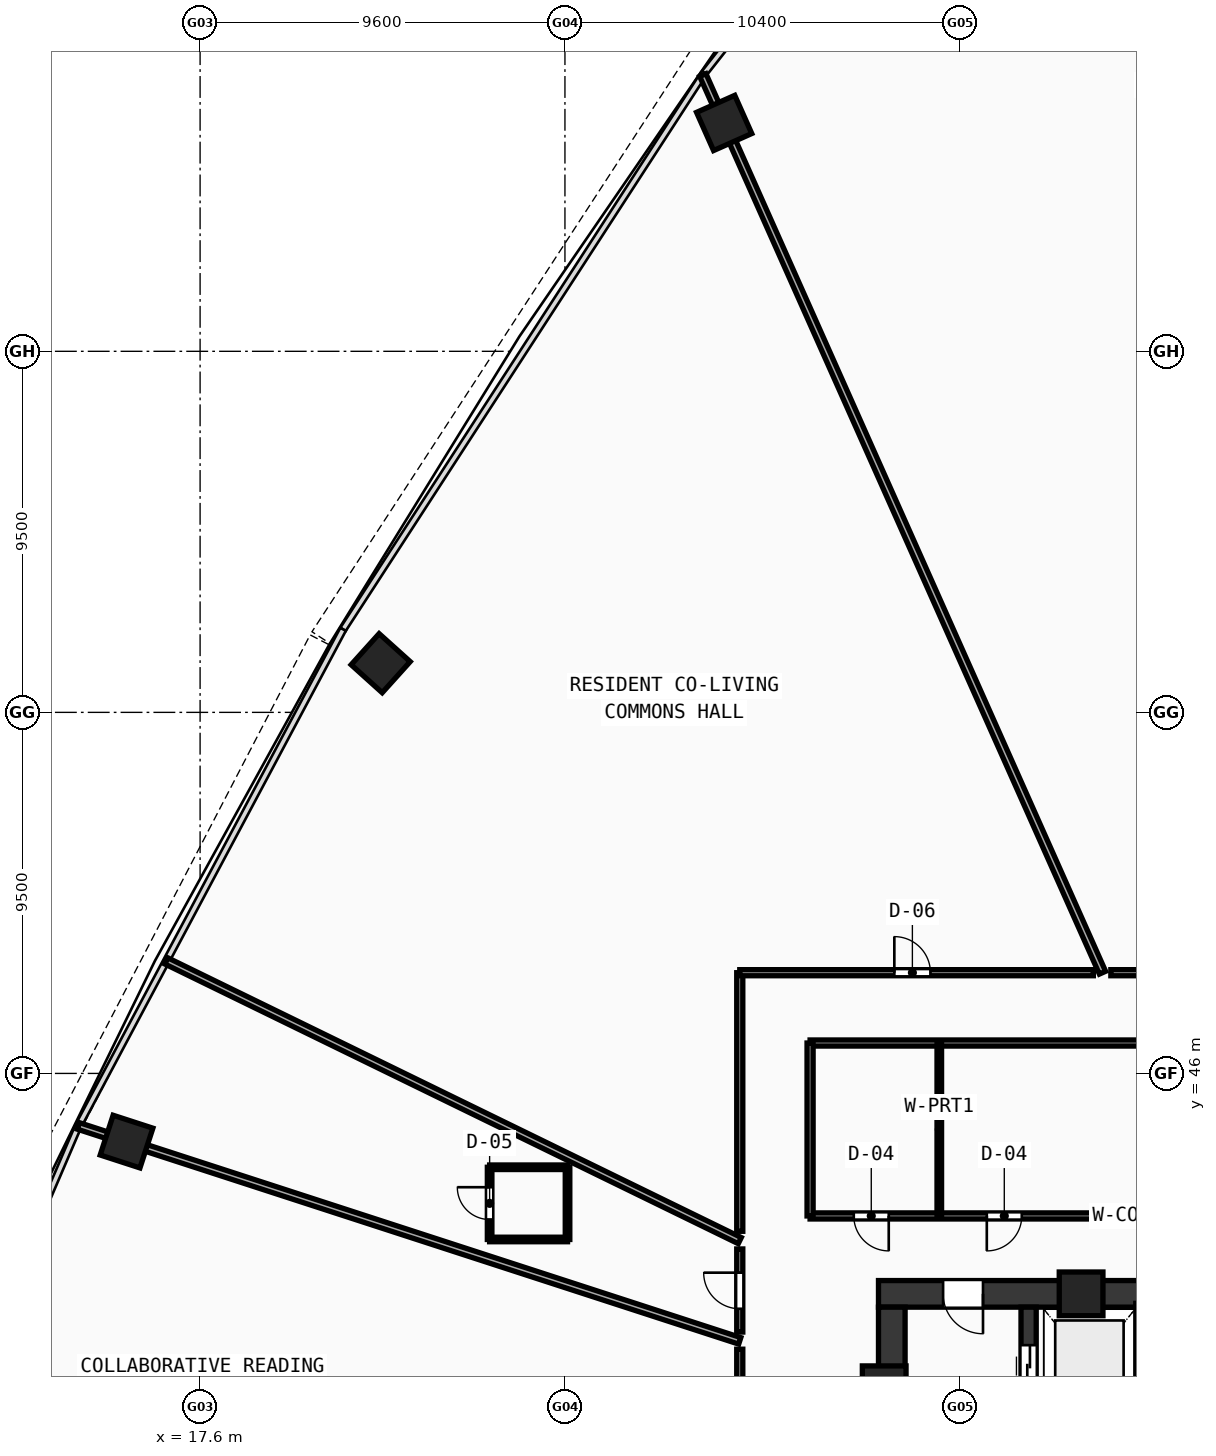
"""IFC4 building model, lengths in metres.
Left out: names, types, materials, properties, quantities, classifications, styles, units other than length and angle.
Written with IfcOpenShell. Run it as: python <this file> out.ifc"""

import sys

from ifc_helpers import new_model, si_unit, direction, frame, frame_2d, origin, origin_with_axes, origin_2d, place, context, subcontext, project, spatial, rectangle, hollow_rectangle, extrude, source, transform, mapped, element, fill, save


model = new_model("IFC4")
c1 = context("Model", 3, precision=1e-05, world=origin(), true_north=direction((0.0, 1.0)))
c2 = subcontext(c1, "Body", "Model", "MODEL_VIEW")
j1 = project(units=[si_unit("LENGTHUNIT", "METRE"), si_unit("PLANEANGLEUNIT", "RADIAN")], contexts=[c1])
p1 = place(None, origin())
s1 = spatial("IfcSite", under=j1, at=p1, CompositionType="ELEMENT")
p2 = place(p1, origin())
s2 = spatial("IfcBuilding", under=s1, at=p2, CompositionType="ELEMENT")
p3 = place(p2, frame((0.0, 0.0, 52.18)))
s3 = spatial("IfcBuildingStorey", under=s2, at=p3, CompositionType="ELEMENT", Elevation=52.18)
p4 = place(p3, frame((35.45, 40.2, 0.0), z_axis=(0.0, 0.0, 1.0), x_axis=(1.0, 0.0, 0.0)))
e1 = element("IfcWall", 1, at=p4, inside=s3, PredefinedType="SHEAR", context=c2, shape_type="SweptSolid", body=[
    extrude(rectangle(XDim=11.35, YDim=0.7, at=frame_2d((5.675, 0.0))), origin(), (0.0, 0.0, 1.0), 3.37),
])
p5 = place(p4, frame((1.7, 0.0, 0.0)))
e2 = element("IfcOpeningElement", 2, at=p5, cuts=e1, PredefinedType="OPENING", context=c2, shape_type="SweptSolid", body=[
    extrude(rectangle(XDim=1.05, YDim=2.1, at=frame_2d((0.525, 1.05))), frame((0.0, 0.36, 0.0), z_axis=(0.0, -1.0, 0.0), x_axis=(1.0, 0.0, 0.0)), (0.0, 0.0, 1.0), 0.72),
])
p6 = place(p3, frame((35.8, 27.85, 0.0), z_axis=(0.0, 0.0, 1.0), x_axis=(0.0, 1.0, 0.0)))
e3 = element("IfcWall", 3, at=p6, inside=s3, PredefinedType="SHEAR", context=c2, shape_type="SweptSolid", body=[
    extrude(rectangle(XDim=12.0, YDim=0.7, at=frame_2d((6.0, 0.0))), origin(), (0.0, 0.0, 1.0), 3.37),
])
p7 = place(p3, frame((39.4, 27.85, 0.0), z_axis=(0.0, 0.0, 1.0), x_axis=(0.0, 1.0, 0.0)))
e4 = element("IfcWall", 4, at=p7, inside=s3, PredefinedType="SHEAR", context=c2, shape_type="SweptSolid", body=[
    extrude(rectangle(XDim=12.0, YDim=0.4, at=frame_2d((6.0, 0.0))), origin(), (0.0, 0.0, 1.0), 3.37),
])
p8 = place(p7, frame((9.9, 0.0, 0.0)))
e5 = element("IfcOpeningElement", 5, at=p8, cuts=e4, PredefinedType="OPENING", context=c2, shape_type="SweptSolid", body=[
    extrude(rectangle(XDim=1.1, YDim=2.1, at=frame_2d((0.55, 1.05))), frame((0.0, 0.21, 0.0), z_axis=(0.0, -1.0, 0.0), x_axis=(1.0, 0.0, 0.0)), (0.0, 0.0, 1.0), 0.42),
])
m1 = source(origin(), c2, "Body", "SweptSolid", [
    extrude(hollow_rectangle(XDim=1.15, YDim=1.15, WallThickness=0.048, at=origin_2d()), origin(), (0.0, 0.0, 1.0), 3.63),
])
for number, where, z_axis, x_axis in (
    (6, (40.781, 40.2, -0.26), (0.0, 0.0, 1.0), (1.0, 0.0, 0.0)),
    (7, (35.6, 37.729, -0.26), (0.0, 0.0, 1.0), (1.0, 0.0, 0.0)),
):
    element("IfcColumn", number, at=place(p3, frame(where, z_axis=z_axis, x_axis=x_axis)), inside=s3, PredefinedType="COLUMN", context=c2, shape_type="MappedRepresentation", body=[
        mapped(m1, transform((0.0, 0.0, 0.0), scale=1.0)),
    ])
m2 = source(origin(), c2, "Body", "SweptSolid", [
    extrude(hollow_rectangle(XDim=1.1, YDim=1.1, WallThickness=0.045, at=origin_2d()), origin(), (0.0, 0.0, 1.0), 3.63),
])
for number, where, z_axis, x_axis in (
    (8, (31.389, 71.009, -0.26), (0.0, 0.0, 1.0), (-0.914, -0.407, 0.0)),
    (9, (22.351, 56.794, -0.26), (0.0, 0.0, 1.0), (-0.669, -0.743, 0.0)),
    (10, (15.665, 44.206, -0.26), (0.0, 0.0, 1.0), (-0.309, -0.951, 0.0)),
):
    element("IfcColumn", number, at=place(p3, frame(where, z_axis=z_axis, x_axis=x_axis)), inside=s3, PredefinedType="COLUMN", context=c2, shape_type="MappedRepresentation", body=[
        mapped(m2, transform((0.0, 0.0, 0.0), scale=1.0)),
    ])
p9 = place(p3, frame((42.32, 33.5, 0.0), z_axis=(0.0, 0.0, 1.0), x_axis=(0.0, 1.0, 0.0)))
e11 = element("IfcWall", 11, at=p9, inside=s3, PredefinedType="SOLIDWALL", context=c2, shape_type="SweptSolid", body=[
    extrude(rectangle(XDim=6.45, YDim=0.2, at=frame_2d((3.225, 0.0))), origin(), (0.0, 0.0, 1.0), 3.37),
])
p10 = place(p9, frame((1.0, 0.0, 0.0)))
e12 = element("IfcOpeningElement", 12, at=p10, cuts=e11, PredefinedType="OPENING", context=c2, shape_type="SweptSolid", body=[
    extrude(rectangle(XDim=1.05, YDim=2.1, at=frame_2d((0.525, 1.05))), frame((0.0, 0.11, 0.0), z_axis=(0.0, -1.0, 0.0), x_axis=(1.0, 0.0, 0.0)), (0.0, 0.0, 1.0), 0.22),
])
p11 = place(p3, frame((33.65, 42.25, 0.0), z_axis=(0.0, 0.0, 1.0), x_axis=(1.0, 0.0, 0.0)))
e13 = element("IfcWall", 13, at=p11, inside=s3, PredefinedType="PARTITIONING", context=c2, shape_type="SweptSolid", body=[
    extrude(rectangle(XDim=10.23, YDim=0.16, at=frame_2d((5.115, 0.0))), origin(), (0.0, 0.0, 1.0), 2.67),
])
p12 = place(p11, frame((1.15, 0.0, 0.0)))
e14 = element("IfcOpeningElement", 14, at=p12, cuts=e13, PredefinedType="OPENING", context=c2, shape_type="SweptSolid", body=[
    extrude(rectangle(XDim=0.92, YDim=2.1, at=frame_2d((0.46, 1.05))), frame((0.0, 0.09, 0.0), z_axis=(0.0, -1.0, 0.0), x_axis=(1.0, 0.0, 0.0)), (0.0, 0.0, 1.0), 0.18),
])
p13 = place(p11, frame((4.65, 0.0, 0.0)))
e15 = element("IfcOpeningElement", 15, at=p13, cuts=e13, PredefinedType="OPENING", context=c2, shape_type="SweptSolid", body=[
    extrude(rectangle(XDim=0.92, YDim=2.1, at=frame_2d((0.46, 1.05))), frame((0.0, 0.09, 0.0), z_axis=(0.0, -1.0, 0.0), x_axis=(1.0, 0.0, 0.0)), (0.0, 0.0, 1.0), 0.18),
])
p14 = place(p3, frame((33.65, 46.8, 0.0), z_axis=(0.0, 0.0, 1.0), x_axis=(1.0, 0.0, 0.0)))
e16 = element("IfcWall", 16, at=p14, inside=s3, PredefinedType="PARTITIONING", context=c2, shape_type="SweptSolid", body=[
    extrude(rectangle(XDim=10.23, YDim=0.16, at=frame_2d((5.115, 0.0))), origin(), (0.0, 0.0, 1.0), 2.67),
])
p15 = place(p3, frame((33.65, 42.25, 0.0), z_axis=(0.0, 0.0, 1.0), x_axis=(0.0, 1.0, 0.0)))
e17 = element("IfcWall", 17, at=p15, inside=s3, PredefinedType="PARTITIONING", context=c2, shape_type="SweptSolid", body=[
    extrude(rectangle(XDim=4.55, YDim=0.16, at=frame_2d((2.275, 0.0))), origin(), (0.0, 0.0, 1.0), 2.67),
])
p16 = place(p3, frame((37.05, 42.25, 0.0), z_axis=(0.0, 0.0, 1.0), x_axis=(0.0, 1.0, 0.0)))
e18 = element("IfcWall", 18, at=p16, inside=s3, PredefinedType="PARTITIONING", context=c2, shape_type="SweptSolid", body=[
    extrude(rectangle(XDim=4.55, YDim=0.12, at=frame_2d((2.275, 0.0))), origin(), (0.0, 0.0, 1.0), 2.67),
])
p17 = place(p3, frame((41.344, 48.65, 0.0), z_axis=(0.0, 0.0, 1.0), x_axis=(-0.406729800422, 0.913548504158, 0.0)))
e19 = element("IfcWall", 19, at=p17, inside=s3, PredefinedType="PARTITIONING", context=c2, shape_type="SweptSolid", body=[
    extrude(rectangle(XDim=25.854, YDim=0.18, at=frame_2d((12.927, 0.0))), origin(), (0.0, 0.0, 1.0), 2.67),
])
p18 = place(p3, frame((31.8, 41.601, 0.0), z_axis=(0.0, 0.0, 1.0), x_axis=(-0.898795978277, 0.438367185625, 0.0)))
e20 = element("IfcWall", 20, at=p18, inside=s3, PredefinedType="PARTITIONING", context=c2, shape_type="SweptSolid", body=[
    extrude(rectangle(XDim=16.788, YDim=0.18, at=frame_2d((8.394, 0.0))), origin(), (0.0, 0.0, 1.0), 2.67),
])
p19 = place(p3, frame((31.8, 38.964, 0.0), z_axis=(0.0, 0.0, 1.0), x_axis=(-0.951052304058, 0.309029958006, 0.0)))
e21 = element("IfcWall", 21, at=p19, inside=s3, PredefinedType="PARTITIONING", context=c2, shape_type="SweptSolid", body=[
    extrude(rectangle(XDim=18.299, YDim=0.18, at=frame_2d((9.149, 0.0))), origin(), (0.0, 0.0, 1.0), 2.67),
])
p20 = place(p3, frame((31.8, 33.354, 0.0), z_axis=(0.0, 0.0, 1.0), x_axis=(0.0, 1.0, 0.0)))
e22 = element("IfcWall", 22, at=p20, inside=s3, PredefinedType="PARTITIONING", context=c2, shape_type="SweptSolid", body=[
    extrude(rectangle(XDim=5.39, YDim=0.16, at=frame_2d((2.695, 0.0))), origin(), (0.0, 0.0, 1.0), 3.37),
])
p21 = place(p20, frame((2.22, 0.0, 0.0)))
e23 = element("IfcOpeningElement", 23, at=p21, cuts=e22, PredefinedType="OPENING", context=c2, shape_type="SweptSolid", body=[
    extrude(rectangle(XDim=0.95, YDim=2.1, at=frame_2d((0.475, 1.05))), frame((0.0, 0.09, 0.0), z_axis=(0.0, -1.0, 0.0), x_axis=(1.0, 0.0, 0.0)), (0.0, 0.0, 1.0), 0.18),
])
p22 = place(p3, frame((31.8, 39.195, 0.0), z_axis=(0.0, 0.0, 1.0), x_axis=(0.0, 1.0, 0.0)))
e24 = element("IfcWall", 24, at=p22, inside=s3, PredefinedType="PARTITIONING", context=c2, shape_type="SweptSolid", body=[
    extrude(rectangle(XDim=2.187, YDim=0.16, at=frame_2d((1.093, 0.0))), origin(), (0.0, 0.0, 1.0), 3.37),
])
p23 = place(p22, frame((0.613, 0.0, 0.0)))
e25 = element("IfcOpeningElement", 25, at=p23, cuts=e24, PredefinedType="OPENING", context=c2, shape_type="SweptSolid", body=[
    extrude(rectangle(XDim=0.95, YDim=2.1, at=frame_2d((0.475, 1.05))), frame((0.0, 0.09, 0.0), z_axis=(0.0, -1.0, 0.0), x_axis=(1.0, 0.0, 0.0)), (0.0, 0.0, 1.0), 0.18),
])
p24 = place(p3, frame((31.8, 41.846, 0.0), z_axis=(0.0, 0.0, 1.0), x_axis=(0.0, 1.0, 0.0)))
e26 = element("IfcWall", 26, at=p24, inside=s3, PredefinedType="PARTITIONING", context=c2, shape_type="SweptSolid", body=[
    extrude(rectangle(XDim=6.804, YDim=0.16, at=frame_2d((3.402, 0.0))), origin(), (0.0, 0.0, 1.0), 2.67),
])
p25 = place(p3, frame((31.8, 48.65, 0.0), z_axis=(0.0, 0.0, 1.0), x_axis=(1.0, 0.0, 0.0)))
e27 = element("IfcWall", 27, at=p25, inside=s3, PredefinedType="PARTITIONING", context=c2, shape_type="SweptSolid", body=[
    extrude(rectangle(XDim=9.303, YDim=0.16, at=frame_2d((4.651, 0.0))), origin(), (0.0, 0.0, 1.0), 2.97),
])
p26 = place(p25, frame((4.067, 0.0, 0.0)))
e28 = element("IfcOpeningElement", 28, at=p26, cuts=e27, PredefinedType="OPENING", context=c2, shape_type="SweptSolid", body=[
    extrude(rectangle(XDim=0.95, YDim=2.1, at=frame_2d((0.475, 1.05))), frame((0.0, 0.09, 0.0), z_axis=(0.0, -1.0, 0.0), x_axis=(1.0, 0.0, 0.0)), (0.0, 0.0, 1.0), 0.18),
])
p27 = place(p3, frame((41.564, 48.65, 0.0), z_axis=(0.0, 0.0, 1.0), x_axis=(1.0, 0.0, 0.0)))
e29 = element("IfcWall", 29, at=p27, inside=s3, PredefinedType="PARTITIONING", context=c2, shape_type="SweptSolid", body=[
    extrude(rectangle(XDim=2.386, YDim=0.16, at=frame_2d((1.193, 0.0))), origin(), (0.0, 0.0, 1.0), 2.67),
])
p28 = place(p3, frame((25.218, 41.631, 0.0), z_axis=(0.0, 0.0, 1.0), x_axis=(1.0, 0.0, 0.0)))
e30 = element("IfcWall", 30, at=p28, inside=s3, PredefinedType="PARTITIONING", context=c2, shape_type="SweptSolid", body=[
    extrude(rectangle(XDim=2.05, YDim=0.12, at=frame_2d((1.025, 0.0))), origin(), (0.0, 0.0, 1.0), 3.37),
])
p29 = place(p3, frame((27.268, 41.631, 0.0), z_axis=(0.0, 0.0, 1.0), x_axis=(0.0, 1.0, 0.0)))
e31 = element("IfcWall", 31, at=p29, inside=s3, PredefinedType="PARTITIONING", context=c2, shape_type="SweptSolid", body=[
    extrude(rectangle(XDim=1.9, YDim=0.12, at=frame_2d((0.95, 0.0))), origin(), (0.0, 0.0, 1.0), 3.37),
])
p30 = place(p3, frame((27.268, 43.531, 0.0), z_axis=(0.0, 0.0, 1.0), x_axis=(-1.0, 0.0, 0.0)))
e32 = element("IfcWall", 32, at=p30, inside=s3, PredefinedType="PARTITIONING", context=c2, shape_type="SweptSolid", body=[
    extrude(rectangle(XDim=2.05, YDim=0.12, at=frame_2d((1.025, 0.0))), origin(), (0.0, 0.0, 1.0), 3.37),
])
p31 = place(p3, frame((25.218, 43.531, 0.0), z_axis=(0.0, 0.0, 1.0), x_axis=(0.0, -1.0, 0.0)))
e33 = element("IfcWall", 33, at=p31, inside=s3, PredefinedType="PARTITIONING", context=c2, shape_type="SweptSolid", body=[
    extrude(rectangle(XDim=1.9, YDim=0.12, at=frame_2d((0.95, 0.0))), origin(), (0.0, 0.0, 1.0), 3.37),
])
p32 = place(p31, frame((0.525, 0.0, 0.0)))
e34 = element("IfcOpeningElement", 34, at=p32, cuts=e33, PredefinedType="OPENING", context=c2, shape_type="SweptSolid", body=[
    extrude(rectangle(XDim=0.85, YDim=2.1, at=frame_2d((0.425, 1.05))), frame((0.0, 0.07, 0.0), z_axis=(0.0, -1.0, 0.0), x_axis=(1.0, 0.0, 0.0)), (0.0, 0.0, 1.0), 0.14),
])
m3 = source(origin(), c2, "Body", "SweptSolid", [
    extrude(rectangle(XDim=1.05, YDim=2.1, at=frame_2d((0.525, 1.05))), frame((0.0, 0.025, 0.0), z_axis=(0.0, -1.0, 0.0), x_axis=(1.0, 0.0, 0.0)), (0.0, 0.0, 1.0), 0.05),
])
p33 = place(p5, frame((1.05, 0.0, 0.0), z_axis=(0.0, 0.0, 1.0), x_axis=(-1.0, 0.0, 0.0)))
e35 = element("IfcDoor", 35, at=p33, inside=s3, OperationType="SINGLE_SWING_LEFT", PredefinedType="DOOR", context=c2, shape_type="MappedRepresentation", body=[
    mapped(m3, transform((0.0, 0.0, 0.0), scale=1.0)),
])
fill(e2, e35)
m4 = source(origin(), c2, "Body", "SweptSolid", [
    extrude(rectangle(XDim=1.1, YDim=2.1, at=frame_2d((0.55, 1.05))), frame((0.0, 0.025, 0.0), z_axis=(0.0, -1.0, 0.0), x_axis=(1.0, 0.0, 0.0)), (0.0, 0.0, 1.0), 0.05),
])
p34 = place(p8, frame((1.1, 0.0, 0.0), z_axis=(0.0, 0.0, 1.0), x_axis=(-1.0, 0.0, 0.0)))
e36 = element("IfcDoor", 36, at=p34, inside=s3, OperationType="DOUBLE_DOOR_SLIDING", PredefinedType="DOOR", context=c2, shape_type="MappedRepresentation", body=[
    mapped(m4, transform((0.0, 0.0, 0.0), scale=1.0)),
])
fill(e5, e36)
m5 = source(origin(), c2, "Body", "SweptSolid", [
    extrude(rectangle(XDim=0.92, YDim=2.1, at=frame_2d((0.46, 1.05))), frame((0.0, 0.025, 0.0), z_axis=(0.0, -1.0, 0.0), x_axis=(1.0, 0.0, 0.0)), (0.0, 0.0, 1.0), 0.05),
])
p35 = place(p12, frame((0.92, 0.0, 0.0), z_axis=(0.0, 0.0, 1.0), x_axis=(-1.0, 0.0, 0.0)))
e37 = element("IfcDoor", 37, at=p35, inside=s3, OperationType="SINGLE_SWING_LEFT", PredefinedType="DOOR", context=c2, shape_type="MappedRepresentation", body=[
    mapped(m5, transform((0.0, 0.0, 0.0), scale=1.0)),
])
fill(e14, e37)
p36 = place(p13, frame((0.92, 0.0, 0.0), z_axis=(0.0, 0.0, 1.0), x_axis=(-1.0, 0.0, 0.0)))
e38 = element("IfcDoor", 38, at=p36, inside=s3, OperationType="SINGLE_SWING_RIGHT", PredefinedType="DOOR", context=c2, shape_type="MappedRepresentation", body=[
    mapped(m5, transform((0.0, 0.0, 0.0), scale=1.0)),
])
fill(e15, e38)
m6 = source(origin(), c2, "Body", "SweptSolid", [
    extrude(rectangle(XDim=0.95, YDim=2.1, at=frame_2d((0.475, 1.05))), frame((0.0, 0.025, 0.0), z_axis=(0.0, -1.0, 0.0), x_axis=(1.0, 0.0, 0.0)), (0.0, 0.0, 1.0), 0.05),
])
p37 = place(p26, origin_with_axes())
e39 = element("IfcDoor", 39, at=p37, inside=s3, OperationType="SINGLE_SWING_LEFT", PredefinedType="DOOR", context=c2, shape_type="MappedRepresentation", body=[
    mapped(m6, transform((0.0, 0.0, 0.0), scale=1.0)),
])
fill(e28, e39)
p38 = place(p23, origin_with_axes())
e40 = element("IfcDoor", 40, at=p38, inside=s3, OperationType="SINGLE_SWING_RIGHT", PredefinedType="DOOR", context=c2, shape_type="MappedRepresentation", body=[
    mapped(m6, transform((0.0, 0.0, 0.0), scale=1.0)),
])
fill(e25, e40)
m7 = source(origin(), c2, "Body", "SweptSolid", [
    extrude(rectangle(XDim=0.85, YDim=2.1, at=frame_2d((0.425, 1.05))), frame((0.0, 0.025, 0.0), z_axis=(0.0, -1.0, 0.0), x_axis=(1.0, 0.0, 0.0)), (0.0, 0.0, 1.0), 0.05),
])
p39 = place(p32, frame((0.85, 0.0, 0.0), z_axis=(0.0, 0.0, 1.0), x_axis=(-1.0, 0.0, 0.0)))
e41 = element("IfcDoor", 41, at=p39, inside=s3, OperationType="SINGLE_SWING_RIGHT", PredefinedType="DOOR", context=c2, shape_type="MappedRepresentation", body=[
    mapped(m7, transform((0.0, 0.0, 0.0), scale=1.0)),
])
fill(e34, e41)
save(model, sys.argv[1])
